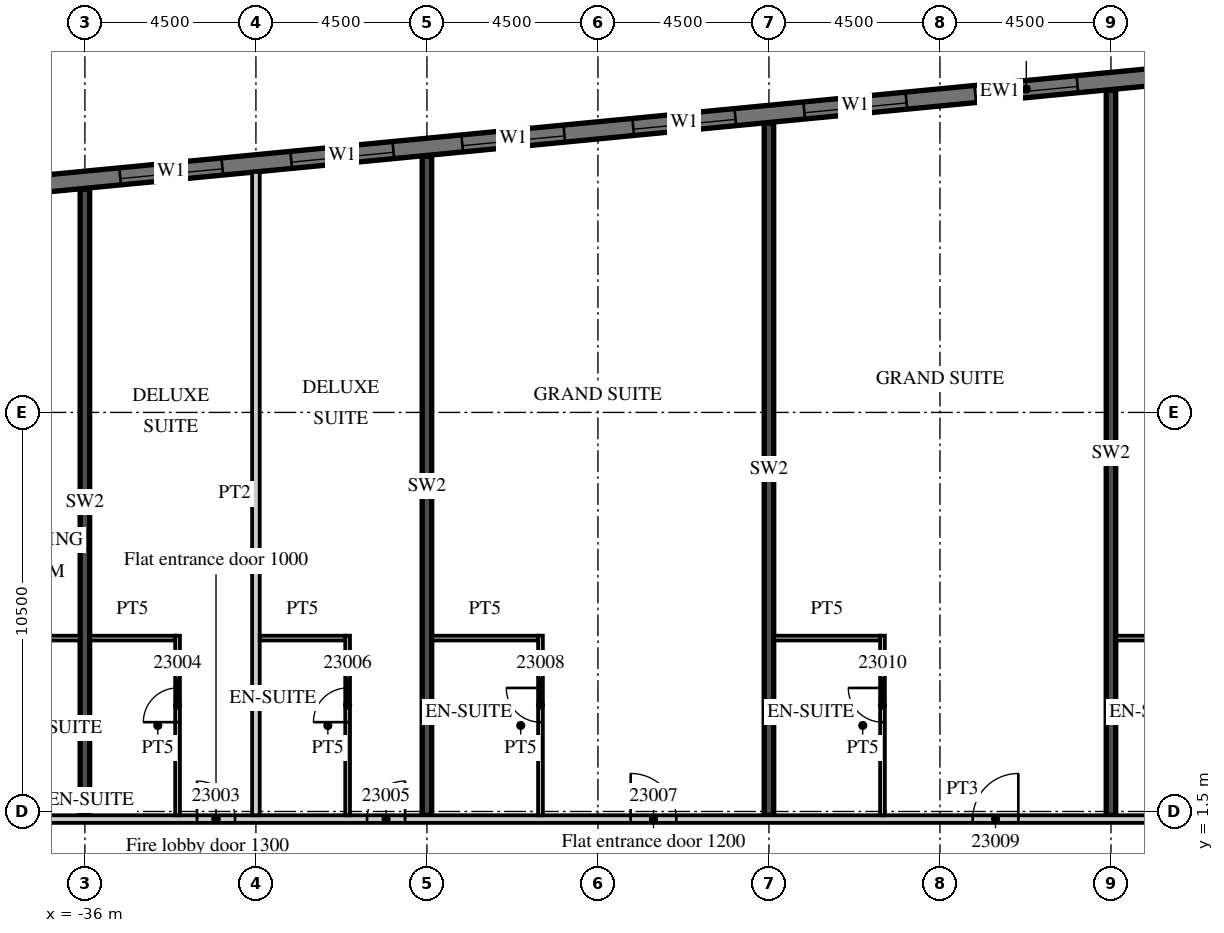
"""IFC4 building model, lengths in metres.
Left out: names, types, materials, properties, quantities, classifications, styles, units other than length and angle.
Written with IfcOpenShell. Run it as: python <this file> out.ifc"""

import sys

from ifc_helpers import new_model, si_unit, direction, frame, frame_2d, origin, place, context, subcontext, project, spatial, rectangle, extrude, element, fill, save


model = new_model("IFC4")
c1 = context("Model", 3, precision=1e-05, world=origin(), true_north=direction((0.0, 1.0)))
c2 = subcontext(c1, "Body", "Model", "MODEL_VIEW")
j1 = project(units=[si_unit("LENGTHUNIT", "METRE"), si_unit("PLANEANGLEUNIT", "RADIAN")], contexts=[c1])
p1 = place(None, origin())
s1 = spatial("IfcSite", under=j1, at=p1, CompositionType="ELEMENT")
p2 = place(p1, origin())
s2 = spatial("IfcBuilding", under=s1, at=p2, CompositionType="ELEMENT")
p3 = place(p2, frame((0.0, 0.0, 110.8)))
s3 = spatial("IfcBuildingStorey", under=s2, at=p3, CompositionType="ELEMENT", Elevation=110.8)
p4 = place(p3, frame((-36.0, 1.4, 0.0), z_axis=(0.0, 0.0, 1.0), x_axis=(0.0, 1.0, 0.0)))
e1 = element("IfcWall", 1, at=p4, inside=s3, PredefinedType="SHEAR", context=c2, shape_type="SweptSolid", body=[
    extrude(rectangle(XDim=16.474, YDim=0.25, at=frame_2d((8.237, 0.0))), origin(), (0.0, 0.0, 1.0), 3.3),
])
p5 = place(p3, frame((-27.0, 1.4, 0.0), z_axis=(0.0, 0.0, 1.0), x_axis=(0.0, 1.0, 0.0)))
e2 = element("IfcWall", 2, at=p5, inside=s3, PredefinedType="SHEAR", context=c2, shape_type="SweptSolid", body=[
    extrude(rectangle(XDim=17.34, YDim=0.25, at=frame_2d((8.67, 0.0))), origin(), (0.0, 0.0, 1.0), 3.3),
])
p6 = place(p3, frame((-18.0, 1.4, 0.0), z_axis=(0.0, 0.0, 1.0), x_axis=(0.0, 1.0, 0.0)))
e3 = element("IfcWall", 3, at=p6, inside=s3, PredefinedType="SHEAR", context=c2, shape_type="SweptSolid", body=[
    extrude(rectangle(XDim=18.207, YDim=0.25, at=frame_2d((9.104, 0.0))), origin(), (0.0, 0.0, 1.0), 3.3),
])
p7 = place(p3, frame((-9.0, 1.4, 0.0), z_axis=(0.0, 0.0, 1.0), x_axis=(0.0, 1.0, 0.0)))
e4 = element("IfcWall", 4, at=p7, inside=s3, PredefinedType="SHEAR", context=c2, shape_type="SweptSolid", body=[
    extrude(rectangle(XDim=19.073, YDim=0.25, at=frame_2d((9.537, 0.0))), origin(), (0.0, 0.0, 1.0), 3.3),
])
p8 = place(p3, frame((13.521, 22.89, 0.0), z_axis=(0.0, 0.0, 1.0), x_axis=(-0.995396445054, -0.095843190545, 0.0)))
e5 = element("IfcWall", 5, at=p8, inside=s3, PredefinedType="SOLIDWALL", context=c2, shape_type="SweptSolid", body=[
    extrude(rectangle(XDim=51.114, YDim=0.45, at=frame_2d((25.557, 0.0))), origin(), (0.0, 0.0, 1.0), 3.02),
])
p9 = place(p8, frame((0.91, 0.0, 0.45)))
e6 = element("IfcOpeningElement", 6, at=p9, cuts=e5, PredefinedType="OPENING", context=c2, shape_type="SweptSolid", body=[
    extrude(rectangle(XDim=2.7, YDim=2.25, at=frame_2d((1.35, 1.125))), frame((0.0, 0.235, 0.0), z_axis=(0.0, -1.0, 0.0), x_axis=(1.0, 0.0, 0.0)), (0.0, 0.0, 1.0), 0.47),
])
p10 = place(p8, frame((5.431, 0.0, 0.45)))
e7 = element("IfcOpeningElement", 7, at=p10, cuts=e5, PredefinedType="OPENING", context=c2, shape_type="SweptSolid", body=[
    extrude(rectangle(XDim=2.7, YDim=2.25, at=frame_2d((1.35, 1.125))), frame((0.0, 0.235, 0.0), z_axis=(0.0, -1.0, 0.0), x_axis=(1.0, 0.0, 0.0)), (0.0, 0.0, 1.0), 0.47),
])
p11 = place(p8, frame((9.952, 0.0, 0.45)))
e8 = element("IfcOpeningElement", 8, at=p11, cuts=e5, PredefinedType="OPENING", context=c2, shape_type="SweptSolid", body=[
    extrude(rectangle(XDim=2.7, YDim=2.25, at=frame_2d((1.35, 1.125))), frame((0.0, 0.235, 0.0), z_axis=(0.0, -1.0, 0.0), x_axis=(1.0, 0.0, 0.0)), (0.0, 0.0, 1.0), 0.47),
])
p12 = place(p8, frame((14.473, 0.0, 0.45)))
e9 = element("IfcOpeningElement", 9, at=p12, cuts=e5, PredefinedType="OPENING", context=c2, shape_type="SweptSolid", body=[
    extrude(rectangle(XDim=2.7, YDim=2.25, at=frame_2d((1.35, 1.125))), frame((0.0, 0.235, 0.0), z_axis=(0.0, -1.0, 0.0), x_axis=(1.0, 0.0, 0.0)), (0.0, 0.0, 1.0), 0.47),
])
p13 = place(p8, frame((18.994, 0.0, 0.45)))
e10 = element("IfcOpeningElement", 10, at=p13, cuts=e5, PredefinedType="OPENING", context=c2, shape_type="SweptSolid", body=[
    extrude(rectangle(XDim=2.7, YDim=2.25, at=frame_2d((1.35, 1.125))), frame((0.0, 0.235, 0.0), z_axis=(0.0, -1.0, 0.0), x_axis=(1.0, 0.0, 0.0)), (0.0, 0.0, 1.0), 0.47),
])
p14 = place(p8, frame((23.514, 0.0, 0.45)))
e11 = element("IfcOpeningElement", 11, at=p14, cuts=e5, PredefinedType="OPENING", context=c2, shape_type="SweptSolid", body=[
    extrude(rectangle(XDim=2.7, YDim=2.25, at=frame_2d((1.35, 1.125))), frame((0.0, 0.235, 0.0), z_axis=(0.0, -1.0, 0.0), x_axis=(1.0, 0.0, 0.0)), (0.0, 0.0, 1.0), 0.47),
])
p15 = place(p8, frame((28.035, 0.0, 0.45)))
e12 = element("IfcOpeningElement", 12, at=p15, cuts=e5, PredefinedType="OPENING", context=c2, shape_type="SweptSolid", body=[
    extrude(rectangle(XDim=2.7, YDim=2.25, at=frame_2d((1.35, 1.125))), frame((0.0, 0.235, 0.0), z_axis=(0.0, -1.0, 0.0), x_axis=(1.0, 0.0, 0.0)), (0.0, 0.0, 1.0), 0.47),
])
p16 = place(p8, frame((32.556, 0.0, 0.45)))
e13 = element("IfcOpeningElement", 13, at=p16, cuts=e5, PredefinedType="OPENING", context=c2, shape_type="SweptSolid", body=[
    extrude(rectangle(XDim=2.7, YDim=2.25, at=frame_2d((1.35, 1.125))), frame((0.0, 0.235, 0.0), z_axis=(0.0, -1.0, 0.0), x_axis=(1.0, 0.0, 0.0)), (0.0, 0.0, 1.0), 0.47),
])
p17 = place(p8, frame((37.077, 0.0, 0.45)))
e14 = element("IfcOpeningElement", 14, at=p17, cuts=e5, PredefinedType="OPENING", context=c2, shape_type="SweptSolid", body=[
    extrude(rectangle(XDim=2.7, YDim=2.25, at=frame_2d((1.35, 1.125))), frame((0.0, 0.235, 0.0), z_axis=(0.0, -1.0, 0.0), x_axis=(1.0, 0.0, 0.0)), (0.0, 0.0, 1.0), 0.47),
])
p18 = place(p8, frame((41.598, 0.0, 0.45)))
e15 = element("IfcOpeningElement", 15, at=p18, cuts=e5, PredefinedType="OPENING", context=c2, shape_type="SweptSolid", body=[
    extrude(rectangle(XDim=2.7, YDim=2.25, at=frame_2d((1.35, 1.125))), frame((0.0, 0.235, 0.0), z_axis=(0.0, -1.0, 0.0), x_axis=(1.0, 0.0, 0.0)), (0.0, 0.0, 1.0), 0.47),
])
p19 = place(p8, frame((46.118, 0.0, 0.45)))
e16 = element("IfcOpeningElement", 16, at=p19, cuts=e5, PredefinedType="OPENING", context=c2, shape_type="SweptSolid", body=[
    extrude(rectangle(XDim=2.7, YDim=2.25, at=frame_2d((1.35, 1.125))), frame((0.0, 0.235, 0.0), z_axis=(0.0, -1.0, 0.0), x_axis=(1.0, 0.0, 0.0)), (0.0, 0.0, 1.0), 0.47),
])
p20 = place(p3, frame((-39.316, 1.3, 0.0), z_axis=(0.0, 0.0, 1.0), x_axis=(1.0, 0.0, 0.0)))
e17 = element("IfcWall", 17, at=p20, inside=s3, PredefinedType="PARTITIONING", context=c2, shape_type="SweptSolid", body=[
    extrude(rectangle(XDim=52.816, YDim=0.2, at=frame_2d((26.408, 0.0))), origin(), (0.0, 0.0, 1.0), 3.02),
])
p21 = place(p20, frame((0.15, 0.0, 0.0)))
e18 = element("IfcOpeningElement", 18, at=p21, cuts=e17, PredefinedType="OPENING", context=c2, shape_type="SweptSolid", body=[
    extrude(rectangle(XDim=0.9, YDim=2.1, at=frame_2d((0.45, 1.05))), frame((0.0, 0.11, 0.0), z_axis=(0.0, -1.0, 0.0), x_axis=(1.0, 0.0, 0.0)), (0.0, 0.0, 1.0), 0.22),
])
p22 = place(p20, frame((6.266, 0.0, 0.0)))
e19 = element("IfcOpeningElement", 19, at=p22, cuts=e17, PredefinedType="OPENING", context=c2, shape_type="SweptSolid", body=[
    extrude(rectangle(XDim=1.0, YDim=2.1, at=frame_2d((0.5, 1.05))), frame((0.0, 0.11, 0.0), z_axis=(0.0, -1.0, 0.0), x_axis=(1.0, 0.0, 0.0)), (0.0, 0.0, 1.0), 0.22),
])
p23 = place(p20, frame((10.741, 0.0, 0.0)))
e20 = element("IfcOpeningElement", 20, at=p23, cuts=e17, PredefinedType="OPENING", context=c2, shape_type="SweptSolid", body=[
    extrude(rectangle(XDim=1.0, YDim=2.1, at=frame_2d((0.5, 1.05))), frame((0.0, 0.11, 0.0), z_axis=(0.0, -1.0, 0.0), x_axis=(1.0, 0.0, 0.0)), (0.0, 0.0, 1.0), 0.22),
])
p24 = place(p20, frame((17.678, 0.0, 0.0)))
e21 = element("IfcOpeningElement", 21, at=p24, cuts=e17, PredefinedType="OPENING", context=c2, shape_type="SweptSolid", body=[
    extrude(rectangle(XDim=1.2, YDim=2.1, at=frame_2d((0.6, 1.05))), frame((0.0, 0.11, 0.0), z_axis=(0.0, -1.0, 0.0), x_axis=(1.0, 0.0, 0.0)), (0.0, 0.0, 1.0), 0.22),
])
p25 = place(p20, frame((26.678, 0.0, 0.0)))
e22 = element("IfcOpeningElement", 22, at=p25, cuts=e17, PredefinedType="OPENING", context=c2, shape_type="SweptSolid", body=[
    extrude(rectangle(XDim=1.2, YDim=2.1, at=frame_2d((0.6, 1.05))), frame((0.0, 0.11, 0.0), z_axis=(0.0, -1.0, 0.0), x_axis=(1.0, 0.0, 0.0)), (0.0, 0.0, 1.0), 0.22),
])
p26 = place(p20, frame((35.678, 0.0, 0.0)))
e23 = element("IfcOpeningElement", 23, at=p26, cuts=e17, PredefinedType="OPENING", context=c2, shape_type="SweptSolid", body=[
    extrude(rectangle(XDim=1.2, YDim=2.1, at=frame_2d((0.6, 1.05))), frame((0.0, 0.11, 0.0), z_axis=(0.0, -1.0, 0.0), x_axis=(1.0, 0.0, 0.0)), (0.0, 0.0, 1.0), 0.22),
])
p27 = place(p20, frame((41.754, 0.0, 0.0)))
e24 = element("IfcOpeningElement", 24, at=p27, cuts=e17, PredefinedType="OPENING", context=c2, shape_type="SweptSolid", body=[
    extrude(rectangle(XDim=1.2, YDim=2.1, at=frame_2d((0.6, 1.05))), frame((0.0, 0.11, 0.0), z_axis=(0.0, -1.0, 0.0), x_axis=(1.0, 0.0, 0.0)), (0.0, 0.0, 1.0), 0.22),
])
p28 = place(p20, frame((51.241, 0.0, 0.0)))
e25 = element("IfcOpeningElement", 25, at=p28, cuts=e17, PredefinedType="OPENING", context=c2, shape_type="SweptSolid", body=[
    extrude(rectangle(XDim=1.0, YDim=2.1, at=frame_2d((0.5, 1.05))), frame((0.0, 0.11, 0.0), z_axis=(0.0, -1.0, 0.0), x_axis=(1.0, 0.0, 0.0)), (0.0, 0.0, 1.0), 0.22),
])
p29 = place(p3, frame((-38.457, 6.062, 0.0), z_axis=(0.0, 0.0, 1.0), x_axis=(1.0, 0.0, 0.0)))
e26 = element("IfcWall", 26, at=p29, inside=s3, PredefinedType="PARTITIONING", context=c2, shape_type="SweptSolid", body=[
    extrude(rectangle(XDim=2.332, YDim=0.125, at=frame_2d((1.166, 0.0))), origin(), (0.0, 0.0, 1.0), 3.02),
])
p30 = place(p3, frame((-31.5, 1.4, 0.0), z_axis=(0.0, 0.0, 1.0), x_axis=(0.0, 1.0, 0.0)))
e27 = element("IfcWall", 27, at=p30, inside=s3, PredefinedType="PARTITIONING", context=c2, shape_type="SweptSolid", body=[
    extrude(rectangle(XDim=16.929, YDim=0.2, at=frame_2d((8.465, 0.0))), origin(), (0.0, 0.0, 1.0), 3.02),
])
p31 = place(p3, frame((-33.562, 1.4, 0.0), z_axis=(0.0, 0.0, 1.0), x_axis=(0.0, 1.0, 0.0)))
e28 = element("IfcWall", 28, at=p31, inside=s3, PredefinedType="PARTITIONING", context=c2, shape_type="SweptSolid", body=[
    extrude(rectangle(XDim=4.725, YDim=0.125, at=frame_2d((2.363, 0.0))), origin(), (0.0, 0.0, 1.0), 3.02),
])
p32 = place(p31, frame((2.45, 0.0, 0.0)))
e29 = element("IfcOpeningElement", 29, at=p32, cuts=e28, PredefinedType="OPENING", context=c2, shape_type="SweptSolid", body=[
    extrude(rectangle(XDim=0.9, YDim=2.1, at=frame_2d((0.45, 1.05))), frame((0.0, 0.073, 0.0), z_axis=(0.0, -1.0, 0.0), x_axis=(1.0, 0.0, 0.0)), (0.0, 0.0, 1.0), 0.145),
])
p33 = place(p3, frame((-35.875, 6.062, 0.0), z_axis=(0.0, 0.0, 1.0), x_axis=(1.0, 0.0, 0.0)))
e30 = element("IfcWall", 30, at=p33, inside=s3, PredefinedType="PARTITIONING", context=c2, shape_type="SweptSolid", body=[
    extrude(rectangle(XDim=2.25, YDim=0.125, at=frame_2d((1.125, 0.0))), origin(), (0.0, 0.0, 1.0), 3.02),
])
p34 = place(p3, frame((-29.087, 1.4, 0.0), z_axis=(0.0, 0.0, 1.0), x_axis=(0.0, 1.0, 0.0)))
e31 = element("IfcWall", 31, at=p34, inside=s3, PredefinedType="PARTITIONING", context=c2, shape_type="SweptSolid", body=[
    extrude(rectangle(XDim=4.725, YDim=0.125, at=frame_2d((2.363, 0.0))), origin(), (0.0, 0.0, 1.0), 3.02),
])
p35 = place(p34, frame((2.45, 0.0, 0.0)))
e32 = element("IfcOpeningElement", 32, at=p35, cuts=e31, PredefinedType="OPENING", context=c2, shape_type="SweptSolid", body=[
    extrude(rectangle(XDim=0.9, YDim=2.1, at=frame_2d((0.45, 1.05))), frame((0.0, 0.073, 0.0), z_axis=(0.0, -1.0, 0.0), x_axis=(1.0, 0.0, 0.0)), (0.0, 0.0, 1.0), 0.145),
])
p36 = place(p3, frame((-31.4, 6.062, 0.0), z_axis=(0.0, 0.0, 1.0), x_axis=(1.0, 0.0, 0.0)))
e33 = element("IfcWall", 33, at=p36, inside=s3, PredefinedType="PARTITIONING", context=c2, shape_type="SweptSolid", body=[
    extrude(rectangle(XDim=2.25, YDim=0.125, at=frame_2d((1.125, 0.0))), origin(), (0.0, 0.0, 1.0), 3.02),
])
p37 = place(p3, frame((-24.012, 1.4, 0.0), z_axis=(0.0, 0.0, 1.0), x_axis=(0.0, 1.0, 0.0)))
e34 = element("IfcWall", 34, at=p37, inside=s3, PredefinedType="PARTITIONING", context=c2, shape_type="SweptSolid", body=[
    extrude(rectangle(XDim=4.725, YDim=0.125, at=frame_2d((2.363, 0.0))), origin(), (0.0, 0.0, 1.0), 3.02),
])
p38 = place(p37, frame((2.45, 0.0, 0.0)))
e35 = element("IfcOpeningElement", 35, at=p38, cuts=e34, PredefinedType="OPENING", context=c2, shape_type="SweptSolid", body=[
    extrude(rectangle(XDim=0.9, YDim=2.1, at=frame_2d((0.45, 1.05))), frame((0.0, 0.073, 0.0), z_axis=(0.0, -1.0, 0.0), x_axis=(1.0, 0.0, 0.0)), (0.0, 0.0, 1.0), 0.145),
])
p39 = place(p3, frame((-26.875, 6.062, 0.0), z_axis=(0.0, 0.0, 1.0), x_axis=(1.0, 0.0, 0.0)))
e36 = element("IfcWall", 36, at=p39, inside=s3, PredefinedType="PARTITIONING", context=c2, shape_type="SweptSolid", body=[
    extrude(rectangle(XDim=2.8, YDim=0.125, at=frame_2d((1.4, 0.0))), origin(), (0.0, 0.0, 1.0), 3.02),
])
p40 = place(p3, frame((-15.012, 1.4, 0.0), z_axis=(0.0, 0.0, 1.0), x_axis=(0.0, 1.0, 0.0)))
e37 = element("IfcWall", 37, at=p40, inside=s3, PredefinedType="PARTITIONING", context=c2, shape_type="SweptSolid", body=[
    extrude(rectangle(XDim=4.725, YDim=0.125, at=frame_2d((2.363, 0.0))), origin(), (0.0, 0.0, 1.0), 3.02),
])
p41 = place(p40, frame((2.45, 0.0, 0.0)))
e38 = element("IfcOpeningElement", 38, at=p41, cuts=e37, PredefinedType="OPENING", context=c2, shape_type="SweptSolid", body=[
    extrude(rectangle(XDim=0.9, YDim=2.1, at=frame_2d((0.45, 1.05))), frame((0.0, 0.073, 0.0), z_axis=(0.0, -1.0, 0.0), x_axis=(1.0, 0.0, 0.0)), (0.0, 0.0, 1.0), 0.145),
])
for number, where, z_axis, x_axis in (
    (39, (-17.875, 6.062, 0.0), (0.0, 0.0, 1.0), (1.0, 0.0, 0.0)),
    (40, (-8.875, 6.062, 0.0), (0.0, 0.0, 1.0), (1.0, 0.0, 0.0)),
):
    element("IfcWall", number, at=place(p3, frame(where, z_axis=z_axis, x_axis=x_axis)), inside=s3, PredefinedType="PARTITIONING", context=c2, shape_type="SweptSolid", body=[
        extrude(rectangle(XDim=2.8, YDim=0.125, at=frame_2d((1.4, 0.0))), origin(), (0.0, 0.0, 1.0), 3.02),
    ])
p42 = place(p14, origin())
e41 = element("IfcWindow", 41, at=p42, inside=s3, PartitioningType="SINGLE_PANEL", PredefinedType="WINDOW", context=c2, shape_type="SweptSolid", body=[
    extrude(rectangle(XDim=2.7, YDim=2.25, at=frame_2d((1.35, 1.125))), frame((0.0, 0.09, 0.0), z_axis=(0.0, -1.0, 0.0), x_axis=(1.0, 0.0, 0.0)), (0.0, 0.0, 1.0), 0.06),
])
fill(e11, e41)
p43 = place(p15, origin())
e42 = element("IfcWindow", 42, at=p43, inside=s3, PartitioningType="SINGLE_PANEL", PredefinedType="WINDOW", context=c2, shape_type="SweptSolid", body=[
    extrude(rectangle(XDim=2.7, YDim=2.25, at=frame_2d((1.35, 1.125))), frame((0.0, 0.09, 0.0), z_axis=(0.0, -1.0, 0.0), x_axis=(1.0, 0.0, 0.0)), (0.0, 0.0, 1.0), 0.06),
])
fill(e12, e42)
p44 = place(p16, origin())
e43 = element("IfcWindow", 43, at=p44, inside=s3, PartitioningType="SINGLE_PANEL", PredefinedType="WINDOW", context=c2, shape_type="SweptSolid", body=[
    extrude(rectangle(XDim=2.7, YDim=2.25, at=frame_2d((1.35, 1.125))), frame((0.0, 0.09, 0.0), z_axis=(0.0, -1.0, 0.0), x_axis=(1.0, 0.0, 0.0)), (0.0, 0.0, 1.0), 0.06),
])
fill(e13, e43)
p45 = place(p17, origin())
e44 = element("IfcWindow", 44, at=p45, inside=s3, PartitioningType="SINGLE_PANEL", PredefinedType="WINDOW", context=c2, shape_type="SweptSolid", body=[
    extrude(rectangle(XDim=2.7, YDim=2.25, at=frame_2d((1.35, 1.125))), frame((0.0, 0.09, 0.0), z_axis=(0.0, -1.0, 0.0), x_axis=(1.0, 0.0, 0.0)), (0.0, 0.0, 1.0), 0.06),
])
fill(e14, e44)
p46 = place(p18, origin())
e45 = element("IfcWindow", 45, at=p46, inside=s3, PartitioningType="SINGLE_PANEL", PredefinedType="WINDOW", context=c2, shape_type="SweptSolid", body=[
    extrude(rectangle(XDim=2.7, YDim=2.25, at=frame_2d((1.35, 1.125))), frame((0.0, 0.09, 0.0), z_axis=(0.0, -1.0, 0.0), x_axis=(1.0, 0.0, 0.0)), (0.0, 0.0, 1.0), 0.06),
])
fill(e15, e45)
p47 = place(p19, origin())
e46 = element("IfcWindow", 46, at=p47, inside=s3, PartitioningType="SINGLE_PANEL", PredefinedType="WINDOW", context=c2, shape_type="SweptSolid", body=[
    extrude(rectangle(XDim=2.7, YDim=2.25, at=frame_2d((1.35, 1.125))), frame((0.0, 0.09, 0.0), z_axis=(0.0, -1.0, 0.0), x_axis=(1.0, 0.0, 0.0)), (0.0, 0.0, 1.0), 0.06),
])
fill(e16, e46)
p48 = place(p22, origin())
e47 = element("IfcDoor", 47, at=p48, inside=s3, OperationType="SINGLE_SWING_LEFT", PredefinedType="DOOR", context=c2, shape_type="SweptSolid", body=[
    extrude(rectangle(XDim=1.0, YDim=2.1, at=frame_2d((0.5, 1.05))), frame((0.0, 0.025, 0.0), z_axis=(0.0, -1.0, 0.0), x_axis=(1.0, 0.0, 0.0)), (0.0, 0.0, 1.0), 0.05),
])
fill(e19, e47)
p49 = place(p32, origin())
e48 = element("IfcDoor", 48, at=p49, inside=s3, OperationType="SINGLE_SWING_LEFT", PredefinedType="DOOR", context=c2, shape_type="SweptSolid", body=[
    extrude(rectangle(XDim=0.9, YDim=2.1, at=frame_2d((0.45, 1.05))), frame((0.0, 0.025, 0.0), z_axis=(0.0, -1.0, 0.0), x_axis=(1.0, 0.0, 0.0)), (0.0, 0.0, 1.0), 0.05),
])
fill(e29, e48)
p50 = place(p23, origin())
e49 = element("IfcDoor", 49, at=p50, inside=s3, OperationType="SINGLE_SWING_RIGHT", PredefinedType="DOOR", context=c2, shape_type="SweptSolid", body=[
    extrude(rectangle(XDim=1.0, YDim=2.1, at=frame_2d((0.5, 1.05))), frame((0.0, 0.025, 0.0), z_axis=(0.0, -1.0, 0.0), x_axis=(1.0, 0.0, 0.0)), (0.0, 0.0, 1.0), 0.05),
])
fill(e20, e49)
p51 = place(p35, origin())
e50 = element("IfcDoor", 50, at=p51, inside=s3, OperationType="SINGLE_SWING_LEFT", PredefinedType="DOOR", context=c2, shape_type="SweptSolid", body=[
    extrude(rectangle(XDim=0.9, YDim=2.1, at=frame_2d((0.45, 1.05))), frame((0.0, 0.025, 0.0), z_axis=(0.0, -1.0, 0.0), x_axis=(1.0, 0.0, 0.0)), (0.0, 0.0, 1.0), 0.05),
])
fill(e32, e50)
p52 = place(p24, origin())
e51 = element("IfcDoor", 51, at=p52, inside=s3, OperationType="SINGLE_SWING_LEFT", PredefinedType="DOOR", context=c2, shape_type="SweptSolid", body=[
    extrude(rectangle(XDim=1.2, YDim=2.1, at=frame_2d((0.6, 1.05))), frame((0.0, 0.025, 0.0), z_axis=(0.0, -1.0, 0.0), x_axis=(1.0, 0.0, 0.0)), (0.0, 0.0, 1.0), 0.05),
])
fill(e21, e51)
p53 = place(p38, origin())
e52 = element("IfcDoor", 52, at=p53, inside=s3, OperationType="SINGLE_SWING_RIGHT", PredefinedType="DOOR", context=c2, shape_type="SweptSolid", body=[
    extrude(rectangle(XDim=0.9, YDim=2.1, at=frame_2d((0.45, 1.05))), frame((0.0, 0.025, 0.0), z_axis=(0.0, -1.0, 0.0), x_axis=(1.0, 0.0, 0.0)), (0.0, 0.0, 1.0), 0.05),
])
fill(e35, e52)
p54 = place(p25, origin())
e53 = element("IfcDoor", 53, at=p54, inside=s3, OperationType="SINGLE_SWING_RIGHT", PredefinedType="DOOR", context=c2, shape_type="SweptSolid", body=[
    extrude(rectangle(XDim=1.2, YDim=2.1, at=frame_2d((0.6, 1.05))), frame((0.0, 0.025, 0.0), z_axis=(0.0, -1.0, 0.0), x_axis=(1.0, 0.0, 0.0)), (0.0, 0.0, 1.0), 0.05),
])
fill(e22, e53)
p55 = place(p41, origin())
e54 = element("IfcDoor", 54, at=p55, inside=s3, OperationType="SINGLE_SWING_RIGHT", PredefinedType="DOOR", context=c2, shape_type="SweptSolid", body=[
    extrude(rectangle(XDim=0.9, YDim=2.1, at=frame_2d((0.45, 1.05))), frame((0.0, 0.025, 0.0), z_axis=(0.0, -1.0, 0.0), x_axis=(1.0, 0.0, 0.0)), (0.0, 0.0, 1.0), 0.05),
])
fill(e38, e54)
save(model, sys.argv[1])
